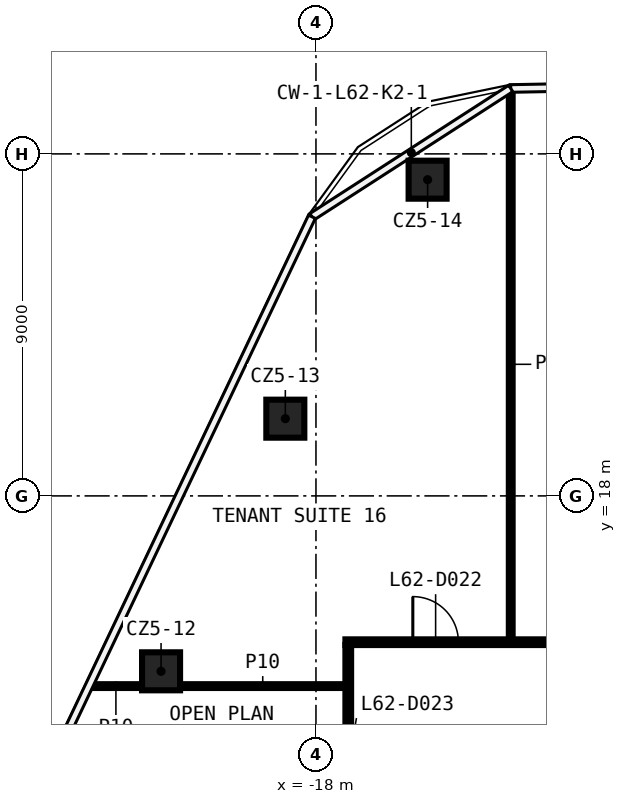
"""IFC4 building model, lengths in metres.
Left out: names, types, materials, properties, quantities, classifications, styles, units other than length and angle.
Written with IfcOpenShell. Run it as: python <this file> out.ifc"""

import sys

from ifc_helpers import new_model, si_unit, direction, frame, frame_2d, origin, origin_2d, place, context, subcontext, project, spatial, rectangle, extrude, element, fill, save


model = new_model("IFC4")
c1 = context("Model", 3, precision=1e-05, world=origin(), true_north=direction((0.0, 1.0)))
c2 = subcontext(c1, "Body", "Model", "MODEL_VIEW")
j1 = project(units=[si_unit("LENGTHUNIT", "METRE"), si_unit("PLANEANGLEUNIT", "RADIAN")], contexts=[c1])
p1 = place(None, origin())
s1 = spatial("IfcSite", under=j1, at=p1, CompositionType="ELEMENT")
p2 = place(p1, origin())
s2 = spatial("IfcBuilding", under=s1, at=p2, CompositionType="ELEMENT")
p3 = place(p2, frame((0.0, 0.0, 294.2)))
s3 = spatial("IfcBuildingStorey", under=s2, at=p3, CompositionType="ELEMENT", Elevation=294.2)
for number, where, z_axis, x_axis in (
    (1, (-22.076, 13.384, 0.0), (0.0, 0.0, 1.0), (1.0, 0.0, 0.0)),
    (2, (-18.806, 20.032, 0.0), (0.0, 0.0, 1.0), (1.0, 0.0, 0.0)),
    (3, (-15.062, 26.321, 0.0), (0.0, 0.0, 1.0), (1.0, 0.0, 0.0)),
):
    element("IfcColumn", number, at=place(p3, frame(where, z_axis=z_axis, x_axis=x_axis)), inside=s3, PredefinedType="COLUMN", context=c2, shape_type="SweptSolid", body=[
        extrude(rectangle(XDim=1.0, YDim=1.0, at=origin_2d()), origin(), (0.0, 0.0, 1.0), 3.82),
    ])
p4 = place(p3, frame((-23.952, 12.995, 0.0), z_axis=(0.0, 0.0, 1.0), x_axis=(1.0, 0.0, 0.0)))
e4 = element("IfcWall", 4, at=p4, inside=s3, PredefinedType="PARTITIONING", context=c2, shape_type="SweptSolid", body=[
    extrude(rectangle(XDim=1.376, YDim=0.1, at=frame_2d((0.688, 0.0))), origin(), (0.0, 0.0, 1.0), 3.82),
])
p5 = place(p3, frame((-21.576, 12.995, 0.0), z_axis=(0.0, 0.0, 1.0), x_axis=(1.0, 0.0, 0.0)))
e5 = element("IfcWall", 5, at=p5, inside=s3, PredefinedType="PARTITIONING", context=c2, shape_type="SweptSolid", body=[
    extrude(rectangle(XDim=4.351, YDim=0.1, at=frame_2d((2.175, 0.0))), origin(), (0.0, 0.0, 1.0), 3.82),
])
p6 = place(p3, frame((-17.225, 14.15, 0.0), z_axis=(0.0, 0.0, 1.0), x_axis=(1.0, 0.0, 0.0)))
e6 = element("IfcWall", 6, at=p6, inside=s3, PredefinedType="PARTITIONING", context=c2, shape_type="SweptSolid", body=[
    extrude(rectangle(XDim=34.45, YDim=0.15, at=frame_2d((17.225, 0.0))), origin(), (0.0, 0.0, 1.0), 3.82),
])
p7 = place(p6, frame((31.962, 0.0, 0.0)))
e7 = element("IfcOpeningElement", 7, at=p7, cuts=e6, PredefinedType="OPENING", context=c2, shape_type="SweptSolid", body=[
    extrude(rectangle(XDim=1.2, YDim=2.1, at=frame_2d((0.6, 1.05))), frame((0.0, 0.085, 0.0), z_axis=(0.0, -1.0, 0.0), x_axis=(1.0, 0.0, 0.0)), (0.0, 0.0, 1.0), 0.17),
])
p8 = place(p6, frame((26.254, 0.0, 0.0)))
e8 = element("IfcOpeningElement", 8, at=p8, cuts=e6, PredefinedType="OPENING", context=c2, shape_type="SweptSolid", body=[
    extrude(rectangle(XDim=1.2, YDim=2.1, at=frame_2d((0.6, 1.05))), frame((0.0, 0.085, 0.0), z_axis=(0.0, -1.0, 0.0), x_axis=(1.0, 0.0, 0.0)), (0.0, 0.0, 1.0), 0.17),
])
p9 = place(p6, frame((20.032, 0.0, 0.0)))
e9 = element("IfcOpeningElement", 9, at=p9, cuts=e6, PredefinedType="OPENING", context=c2, shape_type="SweptSolid", body=[
    extrude(rectangle(XDim=1.2, YDim=2.1, at=frame_2d((0.6, 1.05))), frame((0.0, 0.085, 0.0), z_axis=(0.0, -1.0, 0.0), x_axis=(1.0, 0.0, 0.0)), (0.0, 0.0, 1.0), 0.17),
])
p10 = place(p6, frame((15.378, 0.0, 0.0)))
e10 = element("IfcOpeningElement", 10, at=p10, cuts=e6, PredefinedType="OPENING", context=c2, shape_type="SweptSolid", body=[
    extrude(rectangle(XDim=1.2, YDim=2.1, at=frame_2d((0.6, 1.05))), frame((0.0, 0.085, 0.0), z_axis=(0.0, -1.0, 0.0), x_axis=(1.0, 0.0, 0.0)), (0.0, 0.0, 1.0), 0.17),
])
p11 = place(p6, frame((10.723, 0.0, 0.0)))
e11 = element("IfcOpeningElement", 11, at=p11, cuts=e6, PredefinedType="OPENING", context=c2, shape_type="SweptSolid", body=[
    extrude(rectangle(XDim=1.2, YDim=2.1, at=frame_2d((0.6, 1.05))), frame((0.0, 0.085, 0.0), z_axis=(0.0, -1.0, 0.0), x_axis=(1.0, 0.0, 0.0)), (0.0, 0.0, 1.0), 0.17),
])
p12 = place(p6, frame((6.073, 0.0, 0.0)))
e12 = element("IfcOpeningElement", 12, at=p12, cuts=e6, PredefinedType="OPENING", context=c2, shape_type="SweptSolid", body=[
    extrude(rectangle(XDim=1.2, YDim=2.1, at=frame_2d((0.6, 1.05))), frame((0.0, 0.085, 0.0), z_axis=(0.0, -1.0, 0.0), x_axis=(1.0, 0.0, 0.0)), (0.0, 0.0, 1.0), 0.17),
])
p13 = place(p6, frame((1.774, 0.0, 0.0)))
e13 = element("IfcOpeningElement", 13, at=p13, cuts=e6, PredefinedType="OPENING", context=c2, shape_type="SweptSolid", body=[
    extrude(rectangle(XDim=1.2, YDim=2.1, at=frame_2d((0.6, 1.05))), frame((0.0, 0.085, 0.0), z_axis=(0.0, -1.0, 0.0), x_axis=(1.0, 0.0, 0.0)), (0.0, 0.0, 1.0), 0.17),
])
p14 = place(p3, frame((-12.875, 14.225, 0.0), z_axis=(0.0, 0.0, 1.0), x_axis=(0.0, 1.0, 0.0)))
e14 = element("IfcWall", 14, at=p14, inside=s3, PredefinedType="PARTITIONING", context=c2, shape_type="SweptSolid", body=[
    extrude(rectangle(XDim=14.475, YDim=0.1, at=frame_2d((7.238, 0.0))), origin(), (0.0, 0.0, 1.0), 3.82),
])
p15 = place(p3, frame((-17.15, -14.075, 0.0), z_axis=(0.0, 0.0, 1.0), x_axis=(0.0, 1.0, 0.0)))
e15 = element("IfcWall", 15, at=p15, inside=s3, PredefinedType="PARTITIONING", context=c2, shape_type="SweptSolid", body=[
    extrude(rectangle(XDim=28.15, YDim=0.15, at=frame_2d((14.075, 0.0))), origin(), (0.0, 0.0, 1.0), 3.82),
])
p16 = place(p15, frame((11.151, 0.0, 0.0)))
e16 = element("IfcOpeningElement", 16, at=p16, cuts=e15, PredefinedType="OPENING", context=c2, shape_type="SweptSolid", body=[
    extrude(rectangle(XDim=1.2, YDim=2.1, at=frame_2d((0.6, 1.05))), frame((0.0, 0.085, 0.0), z_axis=(0.0, -1.0, 0.0), x_axis=(1.0, 0.0, 0.0)), (0.0, 0.0, 1.0), 0.17),
])
p17 = place(p15, frame((5.555, 0.0, 0.0)))
e17 = element("IfcOpeningElement", 17, at=p17, cuts=e15, PredefinedType="OPENING", context=c2, shape_type="SweptSolid", body=[
    extrude(rectangle(XDim=1.2, YDim=2.1, at=frame_2d((0.6, 1.05))), frame((0.0, 0.085, 0.0), z_axis=(0.0, -1.0, 0.0), x_axis=(1.0, 0.0, 0.0)), (0.0, 0.0, 1.0), 0.17),
])
p18 = place(p15, frame((1.7, 0.0, 0.0)))
e18 = element("IfcOpeningElement", 18, at=p18, cuts=e15, PredefinedType="OPENING", context=c2, shape_type="SweptSolid", body=[
    extrude(rectangle(XDim=1.2, YDim=2.1, at=frame_2d((0.6, 1.05))), frame((0.0, 0.085, 0.0), z_axis=(0.0, -1.0, 0.0), x_axis=(1.0, 0.0, 0.0)), (0.0, 0.0, 1.0), 0.17),
])
p19 = place(p15, frame((24.41, 0.0, 0.0)))
e19 = element("IfcOpeningElement", 19, at=p19, cuts=e15, PredefinedType="OPENING", context=c2, shape_type="SweptSolid", body=[
    extrude(rectangle(XDim=1.2, YDim=2.1, at=frame_2d((0.6, 1.05))), frame((0.0, 0.085, 0.0), z_axis=(0.0, -1.0, 0.0), x_axis=(1.0, 0.0, 0.0)), (0.0, 0.0, 1.0), 0.17),
])
p20 = place(p15, frame((20.29, 0.0, 0.0)))
e20 = element("IfcOpeningElement", 20, at=p20, cuts=e15, PredefinedType="OPENING", context=c2, shape_type="SweptSolid", body=[
    extrude(rectangle(XDim=1.2, YDim=2.1, at=frame_2d((0.6, 1.05))), frame((0.0, 0.085, 0.0), z_axis=(0.0, -1.0, 0.0), x_axis=(1.0, 0.0, 0.0)), (0.0, 0.0, 1.0), 0.17),
])
p21 = place(p15, frame((16.17, 0.0, 0.0)))
e21 = element("IfcOpeningElement", 21, at=p21, cuts=e15, PredefinedType="OPENING", context=c2, shape_type="SweptSolid", body=[
    extrude(rectangle(XDim=1.2, YDim=2.1, at=frame_2d((0.6, 1.05))), frame((0.0, 0.085, 0.0), z_axis=(0.0, -1.0, 0.0), x_axis=(1.0, 0.0, 0.0)), (0.0, 0.0, 1.0), 0.17),
])
p22 = place(p13, origin())
e22 = element("IfcDoor", 22, at=p22, inside=s3, OperationType="SINGLE_SWING_LEFT", PredefinedType="DOOR", context=c2, shape_type="SweptSolid", body=[
    extrude(rectangle(XDim=1.2, YDim=2.1, at=frame_2d((0.6, 1.05))), frame((0.0, 0.025, 0.0), z_axis=(0.0, -1.0, 0.0), x_axis=(1.0, 0.0, 0.0)), (0.0, 0.0, 1.0), 0.05),
])
fill(e13, e22)
save(model, sys.argv[1])
